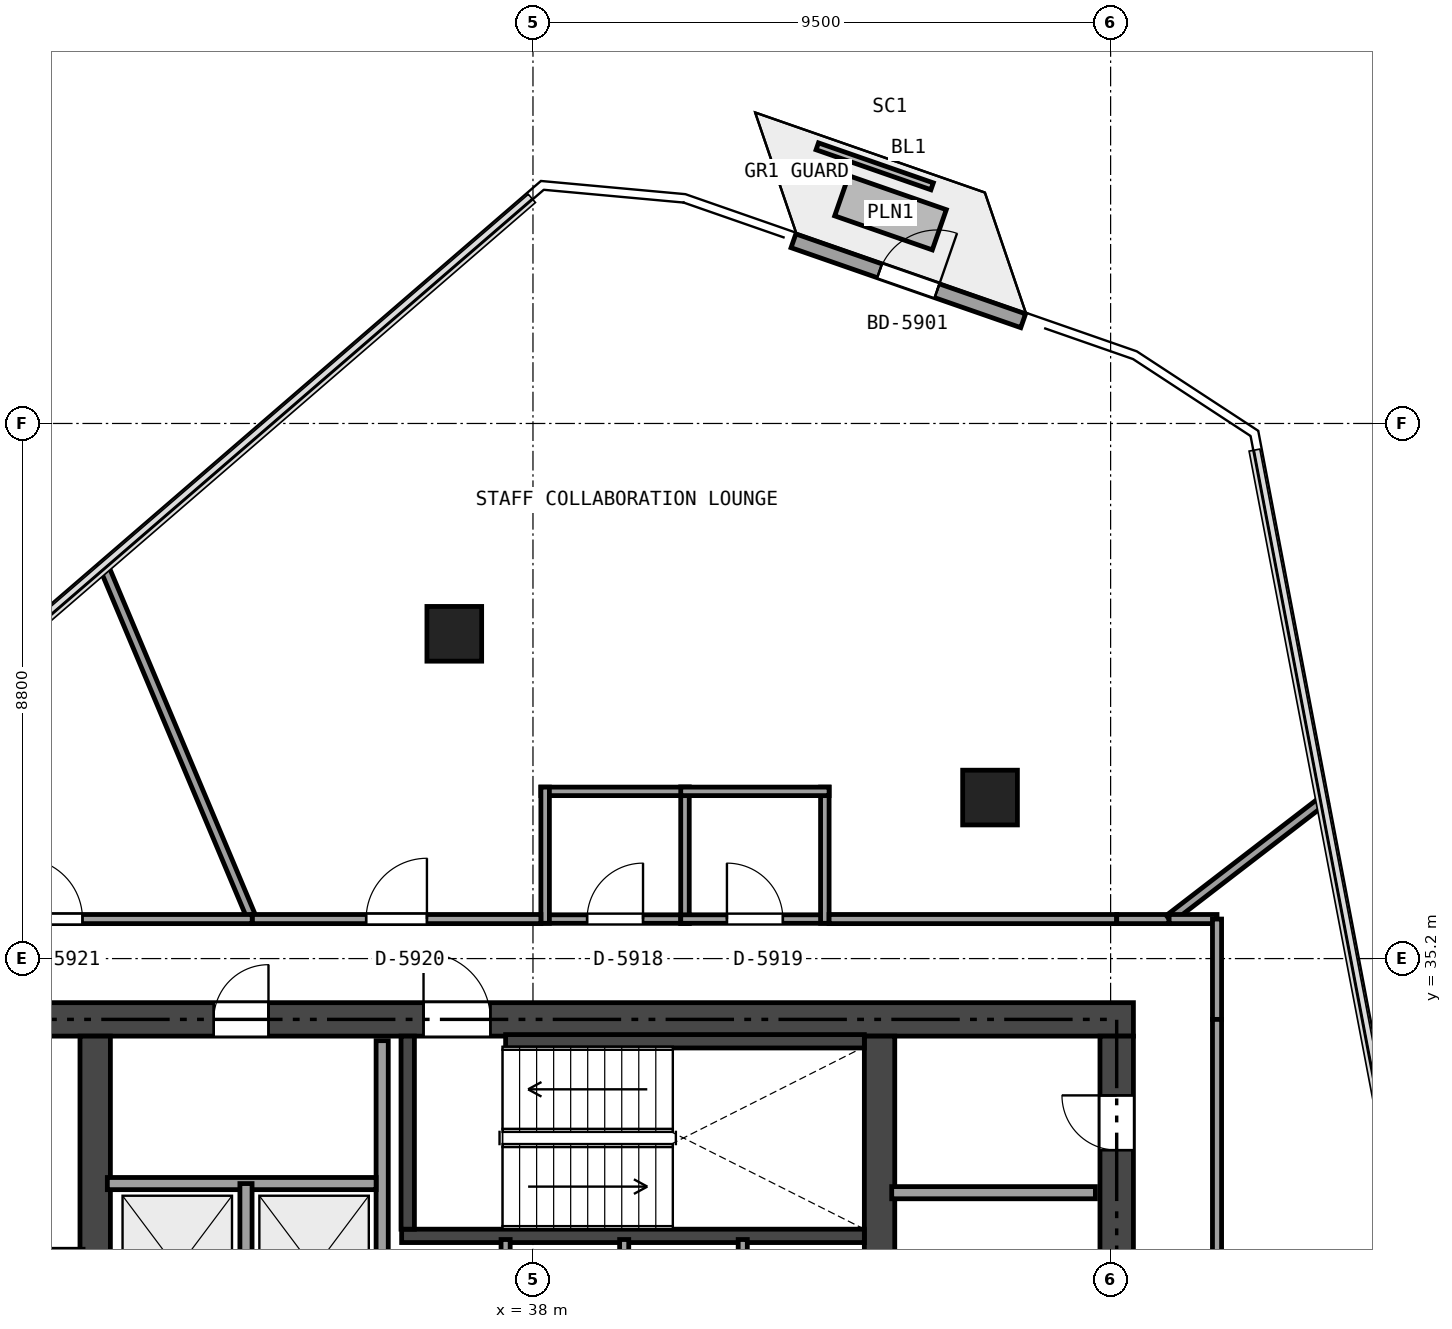
"""IFC4 building model, lengths in metres.
Left out: names, types, materials, properties, quantities, classifications, styles, units other than length and angle.
Written with IfcOpenShell. Run it as: python <this file> out.ifc"""

import sys

from ifc_helpers import new_model, si_unit, direction, frame, frame_2d, origin, origin_2d, place, context, subcontext, project, spatial, rectangle, extrude, element, fill, save


model = new_model("IFC4")
c1 = context("Model", 3, precision=1e-05, world=origin(), true_north=direction((0.0, 1.0)))
c2 = subcontext(c1, "Body", "Model", "MODEL_VIEW")
j1 = project(units=[si_unit("LENGTHUNIT", "METRE"), si_unit("PLANEANGLEUNIT", "RADIAN")], contexts=[c1])
p1 = place(None, origin())
s1 = spatial("IfcSite", under=j1, at=p1, CompositionType="ELEMENT")
p2 = place(p1, origin())
s2 = spatial("IfcBuilding", under=s1, at=p2, CompositionType="ELEMENT")
p3 = place(p2, frame((0.0, 0.0, 220.2)))
s3 = spatial("IfcBuildingStorey", under=s2, at=p3, CompositionType="ELEMENT", Elevation=220.2)
p4 = place(p3, frame((26.525, 34.2, 0.0), z_axis=(0.0, 0.0, 1.0), x_axis=(1.0, 0.0, 0.0)))
e1 = element("IfcWall", 1, at=p4, inside=s3, PredefinedType="SHEAR", context=c2, shape_type="SweptSolid", body=[
    extrude(rectangle(XDim=21.35, YDim=0.55, at=frame_2d((10.675, 0.0))), origin(), (0.0, 0.0, 1.0), 3.24),
])
p5 = place(p4, frame((9.675, 0.0, 0.0)))
e2 = element("IfcOpeningElement", 2, at=p5, cuts=e1, PredefinedType="OPENING", context=c2, shape_type="SweptSolid", body=[
    extrude(rectangle(XDim=1.1, YDim=2.15, at=frame_2d((0.55, 1.075))), frame((0.0, 0.285, 0.0), z_axis=(0.0, -1.0, 0.0), x_axis=(1.0, 0.0, 0.0)), (0.0, 0.0, 1.0), 0.57),
])
p6 = place(p4, frame((1.925, 0.0, 0.0)))
e3 = element("IfcOpeningElement", 3, at=p6, cuts=e1, PredefinedType="OPENING", context=c2, shape_type="SweptSolid", body=[
    extrude(rectangle(XDim=0.9, YDim=2.1, at=frame_2d((0.45, 1.05))), frame((0.0, 0.285, 0.0), z_axis=(0.0, -1.0, 0.0), x_axis=(1.0, 0.0, 0.0)), (0.0, 0.0, 1.0), 0.57),
])
p7 = place(p4, frame((6.225, 0.0, 0.0)))
e4 = element("IfcOpeningElement", 4, at=p7, cuts=e1, PredefinedType="OPENING", context=c2, shape_type="SweptSolid", body=[
    extrude(rectangle(XDim=0.9, YDim=2.1, at=frame_2d((0.45, 1.05))), frame((0.0, 0.285, 0.0), z_axis=(0.0, -1.0, 0.0), x_axis=(1.0, 0.0, 0.0)), (0.0, 0.0, 1.0), 0.57),
])
p8 = place(p3, frame((47.6, 18.875, 0.0), z_axis=(0.0, 0.0, 1.0), x_axis=(0.0, 1.0, 0.0)))
e5 = element("IfcWall", 5, at=p8, inside=s3, PredefinedType="SHEAR", context=c2, shape_type="SweptSolid", body=[
    extrude(rectangle(XDim=15.05, YDim=0.55, at=frame_2d((7.525, 0.0))), origin(), (0.0, 0.0, 1.0), 3.24),
])
p9 = place(p8, frame((6.625, 0.0, 0.0)))
e6 = element("IfcOpeningElement", 6, at=p9, cuts=e5, PredefinedType="OPENING", context=c2, shape_type="SweptSolid", body=[
    extrude(rectangle(XDim=1.1, YDim=2.15, at=frame_2d((0.55, 1.075))), frame((0.0, 0.285, 0.0), z_axis=(0.0, -1.0, 0.0), x_axis=(1.0, 0.0, 0.0)), (0.0, 0.0, 1.0), 0.57),
])
p10 = place(p8, frame((8.525, 0.0, 0.0)))
e7 = element("IfcOpeningElement", 7, at=p10, cuts=e5, PredefinedType="OPENING", context=c2, shape_type="SweptSolid", body=[
    extrude(rectangle(XDim=0.9, YDim=2.1, at=frame_2d((0.45, 1.05))), frame((0.0, 0.285, 0.0), z_axis=(0.0, -1.0, 0.0), x_axis=(1.0, 0.0, 0.0)), (0.0, 0.0, 1.0), 0.57),
])
p11 = place(p8, frame((13.175, 0.0, 0.0)))
e8 = element("IfcOpeningElement", 8, at=p11, cuts=e5, PredefinedType="OPENING", context=c2, shape_type="SweptSolid", body=[
    extrude(rectangle(XDim=0.9, YDim=2.1, at=frame_2d((0.45, 1.05))), frame((0.0, 0.285, 0.0), z_axis=(0.0, -1.0, 0.0), x_axis=(1.0, 0.0, 0.0)), (0.0, 0.0, 1.0), 0.57),
])
p12 = place(p3, frame((30.8, 18.875, 0.0), z_axis=(0.0, 0.0, 1.0), x_axis=(0.0, 1.0, 0.0)))
e9 = element("IfcWall", 9, at=p12, inside=s3, PredefinedType="SHEAR", context=c2, shape_type="SweptSolid", body=[
    extrude(rectangle(XDim=15.05, YDim=0.5, at=frame_2d((7.525, 0.0))), origin(), (0.0, 0.0, 1.0), 3.24),
])
p13 = place(p12, frame((6.625, 0.0, 0.0)))
e10 = element("IfcOpeningElement", 10, at=p13, cuts=e9, PredefinedType="OPENING", context=c2, shape_type="SweptSolid", body=[
    extrude(rectangle(XDim=1.1, YDim=2.15, at=frame_2d((0.55, 1.075))), frame((0.0, 0.26, 0.0), z_axis=(0.0, -1.0, 0.0), x_axis=(1.0, 0.0, 0.0)), (0.0, 0.0, 1.0), 0.52),
])
p14 = place(p12, frame((8.425, 0.0, 0.0)))
e11 = element("IfcOpeningElement", 11, at=p14, cuts=e9, PredefinedType="OPENING", context=c2, shape_type="SweptSolid", body=[
    extrude(rectangle(XDim=0.9, YDim=2.1, at=frame_2d((0.45, 1.05))), frame((0.0, 0.26, 0.0), z_axis=(0.0, -1.0, 0.0), x_axis=(1.0, 0.0, 0.0)), (0.0, 0.0, 1.0), 0.52),
])
p15 = place(p3, frame((43.7, 18.875, 0.0), z_axis=(0.0, 0.0, 1.0), x_axis=(0.0, 1.0, 0.0)))
e12 = element("IfcWall", 12, at=p15, inside=s3, PredefinedType="SHEAR", context=c2, shape_type="SweptSolid", body=[
    extrude(rectangle(XDim=15.05, YDim=0.5, at=frame_2d((7.525, 0.0))), origin(), (0.0, 0.0, 1.0), 3.24),
])
p16 = place(p15, frame((8.125, 0.0, 0.0)))
e13 = element("IfcOpeningElement", 13, at=p16, cuts=e12, PredefinedType="OPENING", context=c2, shape_type="SweptSolid", body=[
    extrude(rectangle(XDim=0.9, YDim=2.1, at=frame_2d((0.45, 1.05))), frame((0.0, 0.26, 0.0), z_axis=(0.0, -1.0, 0.0), x_axis=(1.0, 0.0, 0.0)), (0.0, 0.0, 1.0), 0.52),
])
p17 = place(p3, frame((35.84, 30.64, 0.0), z_axis=(0.0, 0.0, 1.0), x_axis=(1.0, 0.0, 0.0)))
e14 = element("IfcWall", 14, at=p17, inside=s3, PredefinedType="SHEAR", context=c2, shape_type="SweptSolid", body=[
    extrude(rectangle(XDim=7.61, YDim=0.22, at=frame_2d((3.805, 0.0))), origin(), (0.0, 0.0, 1.0), 3.24),
])
p18 = place(p3, frame((35.94, 30.75, 0.0), z_axis=(0.0, 0.0, 1.0), x_axis=(0.0, 1.0, 0.0)))
e15 = element("IfcWall", 15, at=p18, inside=s3, PredefinedType="SHEAR", context=c2, shape_type="SweptSolid", body=[
    extrude(rectangle(XDim=3.175, YDim=0.22, at=frame_2d((1.587, 0.0))), origin(), (0.0, 0.0, 1.0), 3.24),
])
p19 = place(p3, frame((37.55, 33.84, 0.0), z_axis=(0.0, 0.0, 1.0), x_axis=(1.0, 0.0, 0.0)))
e16 = element("IfcWall", 16, at=p19, inside=s3, PredefinedType="SHEAR", context=c2, shape_type="SweptSolid", body=[
    extrude(rectangle(XDim=5.9, YDim=0.22, at=frame_2d((2.95, 0.0))), origin(), (0.0, 0.0, 1.0), 3.24),
])
for number, where, z_axis, x_axis in (
    (17, (45.517, 37.848, 0.0), (0.0, 0.0, 1.0), (1.0, 0.0, 0.0)),
    (18, (36.706, 40.541, 0.0), (0.0, 0.0, 1.0), (1.0, 0.0, 0.0)),
):
    element("IfcColumn", number, at=place(p3, frame(where, z_axis=z_axis, x_axis=x_axis)), inside=s3, PredefinedType="COLUMN", context=c2, shape_type="SweptSolid", body=[
        extrude(rectangle(XDim=0.9, YDim=0.9, at=origin_2d()), origin(), (0.0, 0.0, 1.0), 3.24),
    ])
p20 = place(p3, frame((42.284, 47.004, 0.0), z_axis=(0.0, 0.0, 1.0), x_axis=(0.944432558677, -0.328705251117, 0.0)))
e19 = element("IfcWall", 19, at=p20, inside=s3, PredefinedType="SOLIDWALL", context=c2, shape_type="SweptSolid", body=[
    extrude(rectangle(XDim=4.0, YDim=0.24, at=frame_2d((2.0, 0.0))), origin(), (0.0, 0.0, 1.0), 3.24),
])
p21 = place(p20, frame((1.5, 0.0, 0.0)))
e20 = element("IfcOpeningElement", 20, at=p21, cuts=e19, PredefinedType="OPENING", context=c2, shape_type="SweptSolid", body=[
    extrude(rectangle(XDim=1.0, YDim=2.15, at=frame_2d((0.5, 1.075))), frame((0.0, 0.13, 0.0), z_axis=(0.0, -1.0, 0.0), x_axis=(1.0, 0.0, 0.0)), (0.0, 0.0, 1.0), 0.26),
])
p22 = place(p3, frame((27.15, 30.32, 0.0), z_axis=(0.0, 0.0, 1.0), x_axis=(1.0, 0.0, 0.0)))
e21 = element("IfcWall", 21, at=p22, inside=s3, PredefinedType="SOLIDWALL", context=c2, shape_type="SweptSolid", body=[
    extrude(rectangle(XDim=3.45, YDim=0.2, at=frame_2d((1.725, 0.0))), origin(), (0.0, 0.0, 1.0), 3.24),
])
p23 = place(p3, frame((43.9, 31.35, 0.0), z_axis=(0.0, 0.0, 1.0), x_axis=(1.0, 0.0, 0.0)))
e22 = element("IfcWall", 22, at=p23, inside=s3, PredefinedType="SOLIDWALL", context=c2, shape_type="SweptSolid", body=[
    extrude(rectangle(XDim=3.35, YDim=0.2, at=frame_2d((1.675, 0.0))), origin(), (0.0, 0.0, 1.0), 3.24),
])
p24 = place(p3, frame((35.52, 18.95, 0.0), z_axis=(0.0, 0.0, 1.0), x_axis=(0.0, 1.0, 0.0)))
e23 = element("IfcWall", 23, at=p24, inside=s3, PredefinedType="SOLIDWALL", context=c2, shape_type="SweptSolid", body=[
    extrude(rectangle(XDim=14.9, YDim=0.2, at=frame_2d((7.45, 0.0))), origin(), (0.0, 0.0, 1.0), 2.761),
])
p25 = place(p24, frame((7.755, 0.0, 0.0)))
e24 = element("IfcOpeningElement", 24, at=p25, cuts=e23, PredefinedType="OPENING", context=c2, shape_type="SweptSolid", body=[
    extrude(rectangle(XDim=0.95, YDim=2.15, at=frame_2d((0.475, 1.075))), frame((0.0, 0.11, 0.0), z_axis=(0.0, -1.0, 0.0), x_axis=(1.0, 0.0, 0.0)), (0.0, 0.0, 1.0), 0.22),
])
p26 = place(p24, frame((0.6, 0.0, 0.0)))
e25 = element("IfcOpeningElement", 25, at=p26, cuts=e23, PredefinedType="OPENING", context=c2, shape_type="SweptSolid", body=[
    extrude(rectangle(XDim=0.9, YDim=2.1, at=frame_2d((0.45, 1.05))), frame((0.0, 0.11, 0.0), z_axis=(0.0, -1.0, 0.0), x_axis=(1.0, 0.0, 0.0)), (0.0, 0.0, 1.0), 0.22),
])
p27 = place(p3, frame((31.0, 31.5, 0.0), z_axis=(0.0, 0.0, 1.0), x_axis=(1.0, 0.0, 0.0)))
e26 = element("IfcWall", 26, at=p27, inside=s3, PredefinedType="SOLIDWALL", context=c2, shape_type="SweptSolid", body=[
    extrude(rectangle(XDim=4.42, YDim=0.2, at=frame_2d((2.21, 0.0))), origin(), (0.0, 0.0, 1.0), 3.24),
])
p28 = place(p3, frame((33.28, 28.68, 0.0), z_axis=(0.0, 0.0, 1.0), x_axis=(0.0, 1.0, 0.0)))
e27 = element("IfcWall", 27, at=p28, inside=s3, PredefinedType="SOLIDWALL", context=c2, shape_type="SweptSolid", body=[
    extrude(rectangle(XDim=2.82, YDim=0.2, at=frame_2d((1.41, 0.0))), origin(), (0.0, 0.0, 1.0), 3.24),
])
for number, where, z_axis, x_axis in (
    (28, (37.55, 28.15, 0.0), (0.0, 0.0, 1.0), (0.0, 1.0, 0.0)),
    (29, (39.5, 28.15, 0.0), (0.0, 0.0, 1.0), (0.0, 1.0, 0.0)),
    (30, (41.45, 28.15, 0.0), (0.0, 0.0, 1.0), (0.0, 1.0, 0.0)),
):
    element("IfcWall", number, at=place(p3, frame(where, z_axis=z_axis, x_axis=x_axis)), inside=s3, PredefinedType="PARTITIONING", context=c2, shape_type="SweptSolid", body=[
        extrude(rectangle(XDim=2.43, YDim=0.15, at=frame_2d((1.215, 0.0))), origin(), (0.0, 0.0, 1.0), 3.24),
    ])
p29 = place(p3, frame((38.13, 35.85, 0.0), z_axis=(0.0, 0.0, 1.0), x_axis=(1.0, 0.0, 0.0)))
e31 = element("IfcWall", 31, at=p29, inside=s3, PredefinedType="PARTITIONING", context=c2, shape_type="SweptSolid", body=[
    extrude(rectangle(XDim=2.44, YDim=0.14, at=frame_2d((1.22, 0.0))), origin(), (0.0, 0.0, 1.0), 3.24),
])
p30 = place(p29, frame((0.76, 0.0, 0.0)))
e32 = element("IfcOpeningElement", 32, at=p30, cuts=e31, PredefinedType="OPENING", context=c2, shape_type="SweptSolid", body=[
    extrude(rectangle(XDim=0.92, YDim=2.1, at=frame_2d((0.46, 1.05))), frame((0.0, 0.08, 0.0), z_axis=(0.0, -1.0, 0.0), x_axis=(1.0, 0.0, 0.0)), (0.0, 0.0, 1.0), 0.16),
])
p31 = place(p3, frame((40.5, 35.78, 0.0), z_axis=(0.0, 0.0, 1.0), x_axis=(0.0, 1.0, 0.0)))
e33 = element("IfcWall", 33, at=p31, inside=s3, PredefinedType="PARTITIONING", context=c2, shape_type="SweptSolid", body=[
    extrude(rectangle(XDim=2.24, YDim=0.14, at=frame_2d((1.12, 0.0))), origin(), (0.0, 0.0, 1.0), 2.913),
])
p32 = place(p3, frame((40.57, 37.95, 0.0), z_axis=(0.0, 0.0, 1.0), x_axis=(-1.0, 0.0, 0.0)))
e34 = element("IfcWall", 34, at=p32, inside=s3, PredefinedType="PARTITIONING", context=c2, shape_type="SweptSolid", body=[
    extrude(rectangle(XDim=2.44, YDim=0.14, at=frame_2d((1.22, 0.0))), origin(), (0.0, 0.0, 1.0), 3.24),
])
p33 = place(p3, frame((38.2, 38.02, 0.0), z_axis=(0.0, 0.0, 1.0), x_axis=(0.0, -1.0, 0.0)))
e35 = element("IfcWall", 35, at=p33, inside=s3, PredefinedType="PARTITIONING", context=c2, shape_type="SweptSolid", body=[
    extrude(rectangle(XDim=2.24, YDim=0.14, at=frame_2d((1.12, 0.0))), origin(), (0.0, 0.0, 1.0), 2.913),
])
p34 = place(p3, frame((40.43, 35.85, 0.0), z_axis=(0.0, 0.0, 1.0), x_axis=(1.0, 0.0, 0.0)))
e36 = element("IfcWall", 36, at=p34, inside=s3, PredefinedType="PARTITIONING", context=c2, shape_type="SweptSolid", body=[
    extrude(rectangle(XDim=2.44, YDim=0.14, at=frame_2d((1.22, 0.0))), origin(), (0.0, 0.0, 1.0), 3.24),
])
p35 = place(p34, frame((0.76, 0.0, 0.0)))
e37 = element("IfcOpeningElement", 37, at=p35, cuts=e36, PredefinedType="OPENING", context=c2, shape_type="SweptSolid", body=[
    extrude(rectangle(XDim=0.92, YDim=2.1, at=frame_2d((0.46, 1.05))), frame((0.0, 0.08, 0.0), z_axis=(0.0, -1.0, 0.0), x_axis=(1.0, 0.0, 0.0)), (0.0, 0.0, 1.0), 0.16),
])
p36 = place(p3, frame((42.8, 35.78, 0.0), z_axis=(0.0, 0.0, 1.0), x_axis=(0.0, 1.0, 0.0)))
e38 = element("IfcWall", 38, at=p36, inside=s3, PredefinedType="PARTITIONING", context=c2, shape_type="SweptSolid", body=[
    extrude(rectangle(XDim=2.24, YDim=0.14, at=frame_2d((1.12, 0.0))), origin(), (0.0, 0.0, 1.0), 2.869),
])
p37 = place(p3, frame((42.87, 37.95, 0.0), z_axis=(0.0, 0.0, 1.0), x_axis=(-1.0, 0.0, 0.0)))
e39 = element("IfcWall", 39, at=p37, inside=s3, PredefinedType="PARTITIONING", context=c2, shape_type="SweptSolid", body=[
    extrude(rectangle(XDim=2.44, YDim=0.14, at=frame_2d((1.22, 0.0))), origin(), (0.0, 0.0, 1.0), 2.869),
])
p38 = place(p3, frame((30.932, 41.674, 0.0), z_axis=(0.0, 0.0, 1.0), x_axis=(0.38778750602, -0.921748799931, 0.0)))
e40 = element("IfcWall", 40, at=p38, inside=s3, PredefinedType="PARTITIONING", context=c2, shape_type="SweptSolid", body=[
    extrude(rectangle(XDim=6.318, YDim=0.15, at=frame_2d((3.159, 0.0))), origin(), (0.0, 0.0, 1.0), 2.825),
])
p39 = place(p3, frame((33.382, 35.85, 0.0), z_axis=(0.0, 0.0, 1.0), x_axis=(1.0, 0.0, 0.0)))
e41 = element("IfcWall", 41, at=p39, inside=s3, PredefinedType="PARTITIONING", context=c2, shape_type="SweptSolid", body=[
    extrude(rectangle(XDim=4.748, YDim=0.15, at=frame_2d((2.374, 0.0))), origin(), (0.0, 0.0, 1.0), 2.617),
])
p40 = place(p39, frame((1.874, 0.0, 0.0)))
e42 = element("IfcOpeningElement", 42, at=p40, cuts=e41, PredefinedType="OPENING", context=c2, shape_type="SweptSolid", body=[
    extrude(rectangle(XDim=1.0, YDim=2.15, at=frame_2d((0.5, 1.075))), frame((0.0, 0.085, 0.0), z_axis=(0.0, -1.0, 0.0), x_axis=(1.0, 0.0, 0.0)), (0.0, 0.0, 1.0), 0.17),
])
p41 = place(p3, frame((42.87, 35.85, 0.0), z_axis=(0.0, 0.0, 1.0), x_axis=(1.0, 0.0, 0.0)))
e43 = element("IfcWall", 43, at=p41, inside=s3, PredefinedType="PARTITIONING", context=c2, shape_type="SweptSolid", body=[
    extrude(rectangle(XDim=4.73, YDim=0.15, at=frame_2d((2.365, 0.0))), origin(), (0.0, 0.0, 1.0), 2.617),
])
p42 = place(p3, frame((47.6, 35.85, 0.0), z_axis=(0.0, 0.0, 1.0), x_axis=(1.0, 0.0, 0.0)))
e44 = element("IfcWall", 44, at=p42, inside=s3, PredefinedType="PARTITIONING", context=c2, shape_type="SweptSolid", body=[
    extrude(rectangle(XDim=0.862, YDim=0.15, at=frame_2d((0.431, 0.0))), origin(), (0.0, 0.0, 1.0), 3.24),
])
p43 = place(p3, frame((48.462, 35.85, 0.0), z_axis=(0.0, 0.0, 1.0), x_axis=(0.7925055996, 0.609864636294, 0.0)))
e45 = element("IfcWall", 45, at=p43, inside=s3, PredefinedType="PARTITIONING", context=c2, shape_type="SweptSolid", body=[
    extrude(rectangle(XDim=3.22, YDim=0.15, at=frame_2d((1.61, 0.0))), origin(), (0.0, 0.0, 1.0), 3.24),
])
p44 = place(p3, frame((26.8, 35.85, 0.0), z_axis=(0.0, 0.0, 1.0), x_axis=(1.0, 0.0, 0.0)))
e46 = element("IfcWall", 46, at=p44, inside=s3, PredefinedType="PARTITIONING", context=c2, shape_type="SweptSolid", body=[
    extrude(rectangle(XDim=6.582, YDim=0.15, at=frame_2d((3.291, 0.0))), origin(), (0.0, 0.0, 1.0), 2.617),
])
p45 = place(p44, frame((2.791, 0.0, 0.0)))
e47 = element("IfcOpeningElement", 47, at=p45, cuts=e46, PredefinedType="OPENING", context=c2, shape_type="SweptSolid", body=[
    extrude(rectangle(XDim=1.0, YDim=2.15, at=frame_2d((0.5, 1.075))), frame((0.0, 0.085, 0.0), z_axis=(0.0, -1.0, 0.0), x_axis=(1.0, 0.0, 0.0)), (0.0, 0.0, 1.0), 0.17),
])
p46 = place(p3, frame((48.462, 35.85, 0.0), z_axis=(0.0, 0.0, 1.0), x_axis=(1.0, 0.0, 0.0)))
e48 = element("IfcWall", 48, at=p46, inside=s3, PredefinedType="PARTITIONING", context=c2, shape_type="SweptSolid", body=[
    extrude(rectangle(XDim=0.788, YDim=0.15, at=frame_2d((0.394, 0.0))), origin(), (0.0, 0.0, 1.0), 3.24),
])
p47 = place(p3, frame((49.25, 35.85, 0.0), z_axis=(0.0, 0.0, 1.0), x_axis=(0.0, -1.0, 0.0)))
e49 = element("IfcWall", 49, at=p47, inside=s3, PredefinedType="PARTITIONING", context=c2, shape_type="SweptSolid", body=[
    extrude(rectangle(XDim=1.65, YDim=0.15, at=frame_2d((0.825, 0.0))), origin(), (0.0, 0.0, 1.0), 3.24),
])
p48 = place(p3, frame((49.25, 34.2, 0.0), z_axis=(0.0, 0.0, 1.0), x_axis=(0.0, -1.0, 0.0)))
e50 = element("IfcWall", 50, at=p48, inside=s3, PredefinedType="PARTITIONING", context=c2, shape_type="SweptSolid", body=[
    extrude(rectangle(XDim=15.6, YDim=0.15, at=frame_2d((7.8, 0.0))), origin(), (0.0, 0.0, 1.0), 2.617),
])
p49 = place(p48, frame((7.3, 0.0, 0.0)))
e51 = element("IfcOpeningElement", 51, at=p49, cuts=e50, PredefinedType="OPENING", context=c2, shape_type="SweptSolid", body=[
    extrude(rectangle(XDim=1.0, YDim=2.15, at=frame_2d((0.5, 1.075))), frame((0.0, 0.085, 0.0), z_axis=(0.0, -1.0, 0.0), x_axis=(1.0, 0.0, 0.0)), (0.0, 0.0, 1.0), 0.17),
])
p50 = place(p21, origin())
e52 = element("IfcDoor", 52, at=p50, inside=s3, OperationType="SINGLE_SWING_RIGHT", PredefinedType="DOOR", context=c2, shape_type="SweptSolid", body=[
    extrude(rectangle(XDim=1.0, YDim=2.15, at=frame_2d((0.5, 1.075))), frame((0.0, 0.025, 0.0), z_axis=(0.0, -1.0, 0.0), x_axis=(1.0, 0.0, 0.0)), (0.0, 0.0, 1.0), 0.05),
])
fill(e20, e52)
p51 = place(p5, origin())
e53 = element("IfcDoor", 53, at=p51, inside=s3, OperationType="SINGLE_SWING_LEFT", PredefinedType="DOOR", context=c2, shape_type="SweptSolid", body=[
    extrude(rectangle(XDim=1.1, YDim=2.15, at=frame_2d((0.55, 1.075))), frame((0.0, 0.025, 0.0), z_axis=(0.0, -1.0, 0.0), x_axis=(1.0, 0.0, 0.0)), (0.0, 0.0, 1.0), 0.05),
])
fill(e2, e53)
p52 = place(p7, origin())
e54 = element("IfcDoor", 54, at=p52, inside=s3, OperationType="SINGLE_SWING_RIGHT", PredefinedType="DOOR", context=c2, shape_type="SweptSolid", body=[
    extrude(rectangle(XDim=0.9, YDim=2.1, at=frame_2d((0.45, 1.05))), frame((0.0, 0.025, 0.0), z_axis=(0.0, -1.0, 0.0), x_axis=(1.0, 0.0, 0.0)), (0.0, 0.0, 1.0), 0.05),
])
fill(e4, e54)
p53 = place(p11, origin())
e55 = element("IfcDoor", 55, at=p53, inside=s3, OperationType="SINGLE_SWING_RIGHT", PredefinedType="DOOR", context=c2, shape_type="SweptSolid", body=[
    extrude(rectangle(XDim=0.9, YDim=2.1, at=frame_2d((0.45, 1.05))), frame((0.0, 0.025, 0.0), z_axis=(0.0, -1.0, 0.0), x_axis=(1.0, 0.0, 0.0)), (0.0, 0.0, 1.0), 0.05),
])
fill(e8, e55)
p54 = place(p30, origin())
e56 = element("IfcDoor", 56, at=p54, inside=s3, OperationType="SINGLE_SWING_RIGHT", PredefinedType="DOOR", context=c2, shape_type="SweptSolid", body=[
    extrude(rectangle(XDim=0.92, YDim=2.1, at=frame_2d((0.46, 1.05))), frame((0.0, 0.025, 0.0), z_axis=(0.0, -1.0, 0.0), x_axis=(1.0, 0.0, 0.0)), (0.0, 0.0, 1.0), 0.05),
])
fill(e32, e56)
p55 = place(p35, origin())
e57 = element("IfcDoor", 57, at=p55, inside=s3, OperationType="SINGLE_SWING_LEFT", PredefinedType="DOOR", context=c2, shape_type="SweptSolid", body=[
    extrude(rectangle(XDim=0.92, YDim=2.1, at=frame_2d((0.46, 1.05))), frame((0.0, 0.025, 0.0), z_axis=(0.0, -1.0, 0.0), x_axis=(1.0, 0.0, 0.0)), (0.0, 0.0, 1.0), 0.05),
])
fill(e37, e57)
p56 = place(p40, origin())
e58 = element("IfcDoor", 58, at=p56, inside=s3, OperationType="SINGLE_SWING_RIGHT", PredefinedType="DOOR", context=c2, shape_type="SweptSolid", body=[
    extrude(rectangle(XDim=1.0, YDim=2.15, at=frame_2d((0.5, 1.075))), frame((0.0, 0.025, 0.0), z_axis=(0.0, -1.0, 0.0), x_axis=(1.0, 0.0, 0.0)), (0.0, 0.0, 1.0), 0.05),
])
fill(e42, e58)
p57 = place(p45, origin())
e59 = element("IfcDoor", 59, at=p57, inside=s3, OperationType="SINGLE_SWING_LEFT", PredefinedType="DOOR", context=c2, shape_type="SweptSolid", body=[
    extrude(rectangle(XDim=1.0, YDim=2.15, at=frame_2d((0.5, 1.075))), frame((0.0, 0.025, 0.0), z_axis=(0.0, -1.0, 0.0), x_axis=(1.0, 0.0, 0.0)), (0.0, 0.0, 1.0), 0.05),
])
fill(e47, e59)
save(model, sys.argv[1])
